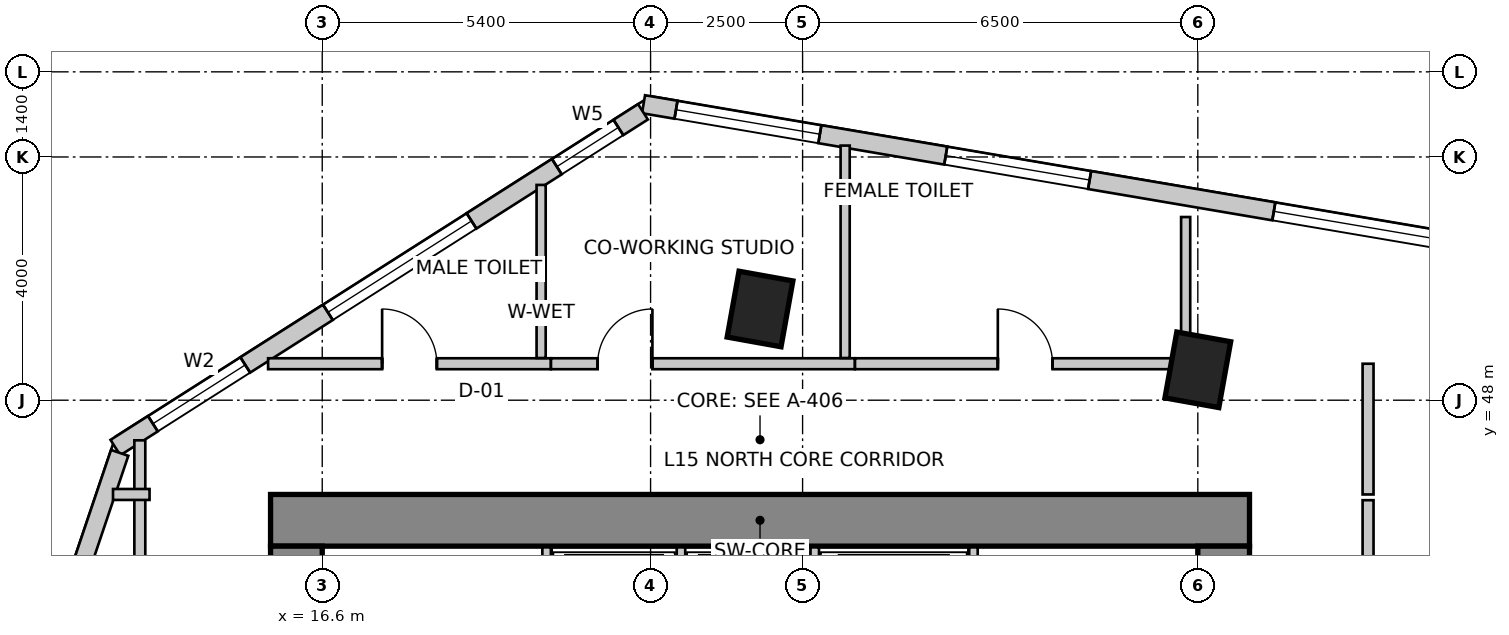
"""IFC4 building model, lengths in metres.
Left out: names, types, materials, properties, quantities, classifications, styles, units other than length and angle.
Written with IfcOpenShell. Run it as: python <this file> out.ifc"""

import sys

from ifc_helpers import new_model, si_unit, direction, frame, frame_2d, origin, origin_2d, place, context, subcontext, project, spatial, rectangle, extrude, source, transform, mapped, element, fill, save


model = new_model("IFC4")
c1 = context("Model", 3, precision=1e-05, world=origin(), true_north=direction((0.0, 1.0)))
c2 = subcontext(c1, "Body", "Model", "MODEL_VIEW")
j1 = project(units=[si_unit("LENGTHUNIT", "METRE"), si_unit("PLANEANGLEUNIT", "RADIAN")], contexts=[c1])
p1 = place(None, origin())
s1 = spatial("IfcSite", under=j1, at=p1, CompositionType="ELEMENT")
p2 = place(p1, origin())
s2 = spatial("IfcBuilding", under=s1, at=p2, CompositionType="ELEMENT")
p3 = place(p2, frame((0.0, 0.0, 63.0)))
s3 = spatial("IfcBuildingStorey", under=s2, at=p3, CompositionType="ELEMENT", Elevation=63.0)
p4 = place(p3, frame((15.75, 46.025, 0.0), z_axis=(0.0, 0.0, 1.0), x_axis=(1.0, 0.0, 0.0)))
e1 = element("IfcWall", 1, at=p4, inside=s3, PredefinedType="SHEAR", context=c2, shape_type="SweptSolid", body=[
    extrude(rectangle(XDim=16.1, YDim=0.85, at=frame_2d((8.05, 0.0))), origin(), (0.0, 0.0, 1.0), 4.0),
])
p5 = place(p3, frame((16.175, 34.2, 0.0), z_axis=(0.0, 0.0, 1.0), x_axis=(0.0, 1.0, 0.0)))
e2 = element("IfcWall", 2, at=p5, inside=s3, PredefinedType="SHEAR", context=c2, shape_type="SweptSolid", body=[
    extrude(rectangle(XDim=11.4, YDim=0.85, at=frame_2d((5.7, 0.0))), origin(), (0.0, 0.0, 1.0), 4.0),
])
m1 = source(origin(), c2, "Body", "SweptSolid", [
    extrude(rectangle(XDim=1.1, YDim=2.15, at=frame_2d((0.55, 1.075))), frame((0.0, 0.435, 0.0), z_axis=(0.0, -1.0, 0.0), x_axis=(1.0, 0.0, 0.0)), (0.0, 0.0, 1.0), 0.87),
])
p6 = place(p5, frame((7.15, 0.0, 0.0)))
e3 = element("IfcOpeningElement", 3, at=p6, cuts=e2, PredefinedType="OPENING", context=c2, shape_type="MappedRepresentation", body=[
    mapped(m1, transform((0.0, 0.0, 0.0), scale=1.0)),
])
p7 = place(p3, frame((31.425, 34.2, 0.0), z_axis=(0.0, 0.0, 1.0), x_axis=(0.0, 1.0, 0.0)))
e4 = element("IfcWall", 4, at=p7, inside=s3, PredefinedType="SHEAR", context=c2, shape_type="SweptSolid", body=[
    extrude(rectangle(XDim=11.4, YDim=0.85, at=frame_2d((5.7, 0.0))), origin(), (0.0, 0.0, 1.0), 4.0),
])
p8 = place(p7, frame((7.35, 0.0, 0.0)))
e5 = element("IfcOpeningElement", 5, at=p8, cuts=e4, PredefinedType="OPENING", context=c2, shape_type="MappedRepresentation", body=[
    mapped(m1, transform((0.0, 0.0, 0.0), scale=1.0)),
])
m2 = source(origin(), c2, "Body", "SweptSolid", [
    extrude(rectangle(XDim=0.9, YDim=1.1, at=origin_2d()), origin(), (0.0, 0.0, 1.0), 4.0),
])
for number, where, z_axis, x_axis in (
    (6, (23.8, 49.5, 0.0), (0.0, 0.0, 1.0), (0.984, -0.177, 0.0)),
    (7, (31.0, 48.5, 0.0), (0.0, 0.0, 1.0), (0.984, -0.177, 0.0)),
):
    element("IfcColumn", number, at=place(p3, frame(where, z_axis=z_axis, x_axis=x_axis)), inside=s3, PredefinedType="COLUMN", context=c2, shape_type="MappedRepresentation", body=[
        mapped(m2, transform((0.0, 0.0, 0.0), scale=1.0)),
    ])
p9 = place(p3, frame((53.961, 47.417, 0.0), z_axis=(0.0, 0.0, 1.0), x_axis=(-0.985865713455, 0.167537443678, 0.0)))
e8 = element("IfcWall", 8, at=p9, inside=s3, PredefinedType="SOLIDWALL", context=c2, shape_type="SweptSolid", body=[
    extrude(rectangle(XDim=32.537, YDim=0.3, at=frame_2d((16.269, 0.0))), origin(), (0.0, 0.0, 1.0), 3.75),
])
m3 = source(origin(), c2, "Body", "SweptSolid", [
    extrude(rectangle(XDim=2.1, YDim=2.0, at=frame_2d((1.05, 1.0))), frame((0.0, 0.16, 0.0), z_axis=(0.0, -1.0, 0.0), x_axis=(1.0, 0.0, 0.0)), (0.0, 0.0, 1.0), 0.32),
])
p10 = place(p9, frame((0.626, 0.0, 0.85)))
e9 = element("IfcOpeningElement", 9, at=p10, cuts=e8, PredefinedType="OPENING", context=c2, shape_type="MappedRepresentation", body=[
    mapped(m3, transform((0.0, 0.0, 0.0), scale=1.0)),
])
m4 = source(origin(), c2, "Body", "SweptSolid", [
    extrude(rectangle(XDim=2.4, YDim=2.2, at=frame_2d((1.2, 1.1))), frame((0.0, 0.16, 0.0), z_axis=(0.0, -1.0, 0.0), x_axis=(1.0, 0.0, 0.0)), (0.0, 0.0, 1.0), 0.32),
])
p11 = place(p9, frame((4.504, 0.0, 0.85)))
e10 = element("IfcOpeningElement", 10, at=p11, cuts=e8, PredefinedType="OPENING", context=c2, shape_type="MappedRepresentation", body=[
    mapped(m4, transform((0.0, 0.0, 0.0), scale=1.0)),
])
m5 = source(origin(), c2, "Body", "SweptSolid", [
    extrude(rectangle(XDim=2.8, YDim=2.4, at=frame_2d((1.4, 1.2))), frame((0.0, 0.16, 0.0), z_axis=(0.0, -1.0, 0.0), x_axis=(1.0, 0.0, 0.0)), (0.0, 0.0, 1.0), 0.32),
])
p12 = place(p9, frame((8.768, 0.0, 0.85)))
e11 = element("IfcOpeningElement", 11, at=p12, cuts=e8, PredefinedType="OPENING", context=c2, shape_type="MappedRepresentation", body=[
    mapped(m5, transform((0.0, 0.0, 0.0), scale=1.0)),
])
p13 = place(p9, frame((14.234, 0.0, 0.85)))
e12 = element("IfcOpeningElement", 12, at=p13, cuts=e8, PredefinedType="OPENING", context=c2, shape_type="MappedRepresentation", body=[
    mapped(m4, transform((0.0, 0.0, 0.0), scale=1.0)),
])
p14 = place(p9, frame((19.222, 0.0, 0.85)))
e13 = element("IfcOpeningElement", 13, at=p14, cuts=e8, PredefinedType="OPENING", context=c2, shape_type="MappedRepresentation", body=[
    mapped(m5, transform((0.0, 0.0, 0.0), scale=1.0)),
])
p15 = place(p9, frame((25.095, 0.0, 0.85)))
e14 = element("IfcOpeningElement", 14, at=p15, cuts=e8, PredefinedType="OPENING", context=c2, shape_type="MappedRepresentation", body=[
    mapped(m4, transform((0.0, 0.0, 0.0), scale=1.0)),
])
p16 = place(p9, frame((29.595, 0.0, 0.85)))
e15 = element("IfcOpeningElement", 15, at=p16, cuts=e8, PredefinedType="OPENING", context=c2, shape_type="MappedRepresentation", body=[
    mapped(m4, transform((0.0, 0.0, 0.0), scale=1.0)),
])
p17 = place(p3, frame((21.875, 52.742, 0.0), z_axis=(0.0, 0.0, 1.0), x_axis=(-0.843662465249, -0.536873956092, 0.0)))
e16 = element("IfcWall", 16, at=p17, inside=s3, PredefinedType="SOLIDWALL", context=c2, shape_type="SweptSolid", body=[
    extrude(rectangle(XDim=10.284, YDim=0.3, at=frame_2d((5.142, 0.0))), origin(), (0.0, 0.0, 1.0), 3.75),
])
m6 = source(origin(), c2, "Body", "SweptSolid", [
    extrude(rectangle(XDim=1.2, YDim=1.6, at=frame_2d((0.6, 0.8))), frame((0.0, 0.16, 0.0), z_axis=(0.0, -1.0, 0.0), x_axis=(1.0, 0.0, 0.0)), (0.0, 0.0, 1.0), 0.32),
])
p18 = place(p17, frame((0.479, 0.0, 0.85)))
e17 = element("IfcOpeningElement", 17, at=p18, cuts=e16, PredefinedType="OPENING", context=c2, shape_type="MappedRepresentation", body=[
    mapped(m6, transform((0.0, 0.0, 0.0), scale=1.0)),
])
p19 = place(p17, frame((3.342, 0.0, 0.85)))
e18 = element("IfcOpeningElement", 18, at=p19, cuts=e16, PredefinedType="OPENING", context=c2, shape_type="MappedRepresentation", body=[
    mapped(m5, transform((0.0, 0.0, 0.0), scale=1.0)),
])
m7 = source(origin(), c2, "Body", "SweptSolid", [
    extrude(rectangle(XDim=1.8, YDim=2.1, at=frame_2d((0.9, 1.05))), frame((0.0, 0.16, 0.0), z_axis=(0.0, -1.0, 0.0), x_axis=(1.0, 0.0, 0.0)), (0.0, 0.0, 1.0), 0.32),
])
p20 = place(p17, frame((7.753, 0.0, 0.85)))
e19 = element("IfcOpeningElement", 19, at=p20, cuts=e16, PredefinedType="OPENING", context=c2, shape_type="MappedRepresentation", body=[
    mapped(m7, transform((0.0, 0.0, 0.0), scale=1.0)),
])
p21 = place(p3, frame((13.269, 47.134, 0.0), z_axis=(0.0, 0.0, 1.0), x_axis=(-0.319920423265, -0.947444416722, 0.0)))
e20 = element("IfcWall", 20, at=p21, inside=s3, PredefinedType="SOLIDWALL", context=c2, shape_type="SweptSolid", body=[
    extrude(rectangle(XDim=16.135, YDim=0.3, at=frame_2d((8.067, 0.0))), origin(), (0.0, 0.0, 1.0), 3.75),
])
p22 = place(p21, frame((2.188, 0.0, 0.85)))
e21 = element("IfcOpeningElement", 21, at=p22, cuts=e20, PredefinedType="OPENING", context=c2, shape_type="MappedRepresentation", body=[
    mapped(m4, transform((0.0, 0.0, 0.0), scale=1.0)),
])
p23 = place(p21, frame((6.959, 0.0, 0.85)))
e22 = element("IfcOpeningElement", 22, at=p23, cuts=e20, PredefinedType="OPENING", context=c2, shape_type="MappedRepresentation", body=[
    mapped(m5, transform((0.0, 0.0, 0.0), scale=1.0)),
])
p24 = place(p21, frame((12.13, 0.0, 0.85)))
e23 = element("IfcOpeningElement", 23, at=p24, cuts=e20, PredefinedType="OPENING", context=c2, shape_type="MappedRepresentation", body=[
    mapped(m4, transform((0.0, 0.0, 0.0), scale=1.0)),
])
for number, where, z_axis, x_axis in (
    (24, (20.29, 43.28, 0.0), (0.0, 0.0, 1.0), (0.0, 1.0, 0.0)),
    (25, (27.31, 43.28, 0.0), (0.0, 0.0, 1.0), (0.0, 1.0, 0.0)),
):
    element("IfcWall", number, at=place(p3, frame(where, z_axis=z_axis, x_axis=x_axis)), inside=s3, PredefinedType="SOLIDWALL", context=c2, shape_type="SweptSolid", body=[
        extrude(rectangle(XDim=2.3, YDim=0.14, at=frame_2d((1.15, 0.0))), origin(), (0.0, 0.0, 1.0), 3.75),
    ])
for number, where, z_axis, x_axis in (
    (26, (22.5, 43.02, 0.0), (0.0, 0.0, 1.0), (0.0, 1.0, 0.0)),
    (27, (24.7, 43.02, 0.0), (0.0, 0.0, 1.0), (0.0, 1.0, 0.0)),
):
    element("IfcWall", number, at=place(p3, frame(where, z_axis=z_axis, x_axis=x_axis)), inside=s3, PredefinedType="SOLIDWALL", context=c2, shape_type="SweptSolid", body=[
        extrude(rectangle(XDim=2.56, YDim=0.14, at=frame_2d((1.28, 0.0))), origin(), (0.0, 0.0, 1.0), 3.75),
    ])
p25 = place(p3, frame((13.6, 33.444, 0.0), z_axis=(0.0, 0.0, 1.0), x_axis=(0.0, 1.0, 0.0)))
e28 = element("IfcWall", 28, at=p25, inside=s3, PredefinedType="PARTITIONING", context=c2, shape_type="SweptSolid", body=[
    extrude(rectangle(XDim=13.896, YDim=0.18, at=frame_2d((6.948, 0.0))), origin(), (0.0, 0.0, 1.0), 2.892),
])
m8 = source(origin(), c2, "Body", "SweptSolid", [
    extrude(rectangle(XDim=0.9, YDim=2.15, at=frame_2d((0.45, 1.075))), frame((0.0, 0.1, 0.0), z_axis=(0.0, -1.0, 0.0), x_axis=(1.0, 0.0, 0.0)), (0.0, 0.0, 1.0), 0.2),
])
p26 = place(p25, frame((4.144, 0.0, 0.0)))
e29 = element("IfcOpeningElement", 29, at=p26, cuts=e28, PredefinedType="OPENING", context=c2, shape_type="MappedRepresentation", body=[
    mapped(m8, transform((0.0, 0.0, 0.0), scale=1.0)),
])
p27 = place(p3, frame((13.76, 46.45, 0.0), z_axis=(0.0, 0.0, 1.0), x_axis=(-1.0, 0.0, 0.0)))
e30 = element("IfcWall", 30, at=p27, inside=s3, PredefinedType="PARTITIONING", context=c2, shape_type="SweptSolid", body=[
    extrude(rectangle(XDim=0.601, YDim=0.18, at=frame_2d((0.301, 0.0))), origin(), (0.0, 0.0, 1.0), 3.75),
])
p28 = place(p3, frame((15.71, 48.6, 0.0), z_axis=(0.0, 0.0, 1.0), x_axis=(1.0, 0.0, 0.0)))
e31 = element("IfcWall", 31, at=p28, inside=s3, PredefinedType="PARTITIONING", context=c2, shape_type="SweptSolid", body=[
    extrude(rectangle(XDim=4.65, YDim=0.18, at=frame_2d((2.325, 0.0))), origin(), (0.0, 0.0, 1.0), 3.75),
])
p29 = place(p28, frame((1.875, 0.0, 0.0)))
e32 = element("IfcOpeningElement", 32, at=p29, cuts=e31, PredefinedType="OPENING", context=c2, shape_type="MappedRepresentation", body=[
    mapped(m8, transform((0.0, 0.0, 0.0), scale=1.0)),
])
p30 = place(p3, frame((20.362, 48.6, 0.0), z_axis=(0.0, 0.0, 1.0), x_axis=(1.0, 0.0, 0.0)))
e33 = element("IfcWall", 33, at=p30, inside=s3, PredefinedType="PARTITIONING", context=c2, shape_type="SweptSolid", body=[
    extrude(rectangle(XDim=4.998, YDim=0.18, at=frame_2d((2.499, 0.0))), origin(), (0.0, 0.0, 1.0), 3.335),
])
p31 = place(p30, frame((0.768, 0.0, 0.0)))
e34 = element("IfcOpeningElement", 34, at=p31, cuts=e33, PredefinedType="OPENING", context=c2, shape_type="MappedRepresentation", body=[
    mapped(m8, transform((0.0, 0.0, 0.0), scale=1.0)),
])
p32 = place(p3, frame((25.362, 48.6, 0.0), z_axis=(0.0, 0.0, 1.0), x_axis=(1.0, 0.0, 0.0)))
e35 = element("IfcWall", 35, at=p32, inside=s3, PredefinedType="PARTITIONING", context=c2, shape_type="SweptSolid", body=[
    extrude(rectangle(XDim=5.598, YDim=0.18, at=frame_2d((2.799, 0.0))), origin(), (0.0, 0.0, 1.0), 2.892),
])
p33 = place(p32, frame((2.349, 0.0, 0.0)))
e36 = element("IfcOpeningElement", 36, at=p33, cuts=e35, PredefinedType="OPENING", context=c2, shape_type="MappedRepresentation", body=[
    mapped(m8, transform((0.0, 0.0, 0.0), scale=1.0)),
])
p34 = place(p3, frame((33.8, 48.6, 0.0), z_axis=(0.0, 0.0, 1.0), x_axis=(0.0, -1.0, 0.0)))
e37 = element("IfcWall", 37, at=p34, inside=s3, PredefinedType="PARTITIONING", context=c2, shape_type="SweptSolid", body=[
    extrude(rectangle(XDim=2.15, YDim=0.18, at=frame_2d((1.075, 0.0))), origin(), (0.0, 0.0, 1.0), 2.892),
])
p35 = place(p3, frame((33.8, 46.356, 0.0), z_axis=(0.0, 0.0, 1.0), x_axis=(0.0, -1.0, 0.0)))
e38 = element("IfcWall", 38, at=p35, inside=s3, PredefinedType="PARTITIONING", context=c2, shape_type="SweptSolid", body=[
    extrude(rectangle(XDim=3.716, YDim=0.18, at=frame_2d((1.858, 0.0))), origin(), (0.0, 0.0, 1.0), 3.188),
])
p36 = place(p3, frame((20.2, 51.54, 0.0), z_axis=(0.0, 0.0, 1.0), x_axis=(0.0, -1.0, 0.0)))
e39 = element("IfcWall", 39, at=p36, inside=s3, PredefinedType="PARTITIONING", context=c2, shape_type="SweptSolid", body=[
    extrude(rectangle(XDim=2.846, YDim=0.15, at=frame_2d((1.423, 0.0))), origin(), (0.0, 0.0, 1.0), 3.75),
])
p37 = place(p3, frame((25.2, 52.188, 0.0), z_axis=(0.0, 0.0, 1.0), x_axis=(0.0, -1.0, 0.0)))
e40 = element("IfcWall", 40, at=p37, inside=s3, PredefinedType="PARTITIONING", context=c2, shape_type="SweptSolid", body=[
    extrude(rectangle(XDim=3.493, YDim=0.15, at=frame_2d((1.747, 0.0))), origin(), (0.0, 0.0, 1.0), 2.892),
])
p38 = place(p3, frame((30.8, 51.013, 0.0), z_axis=(0.0, 0.0, 1.0), x_axis=(0.0, -1.0, 0.0)))
e41 = element("IfcWall", 41, at=p38, inside=s3, PredefinedType="PARTITIONING", context=c2, shape_type="SweptSolid", body=[
    extrude(rectangle(XDim=2.193, YDim=0.15, at=frame_2d((1.096, 0.0))), origin(), (0.0, 0.0, 1.0), 3.75),
])
m9 = source(origin(), c2, "Body", "SweptSolid", [
    extrude(rectangle(XDim=2.8, YDim=2.4, at=frame_2d((1.4, 1.2))), frame((0.0, -0.015, 0.0), z_axis=(0.0, -1.0, 0.0), x_axis=(1.0, 0.0, 0.0)), (0.0, 0.0, 1.0), 0.06),
])
p39 = place(p14, origin())
e42 = element("IfcWindow", 42, at=p39, inside=s3, PartitioningType="SINGLE_PANEL", PredefinedType="WINDOW", context=c2, shape_type="MappedRepresentation", body=[
    mapped(m9, transform((0.0, 0.0, 0.0), scale=1.0)),
])
fill(e13, e42)
m10 = source(origin(), c2, "Body", "SweptSolid", [
    extrude(rectangle(XDim=2.4, YDim=2.2, at=frame_2d((1.2, 1.1))), frame((0.0, -0.015, 0.0), z_axis=(0.0, -1.0, 0.0), x_axis=(1.0, 0.0, 0.0)), (0.0, 0.0, 1.0), 0.06),
])
p40 = place(p15, origin())
e43 = element("IfcWindow", 43, at=p40, inside=s3, PartitioningType="SINGLE_PANEL", PredefinedType="WINDOW", context=c2, shape_type="MappedRepresentation", body=[
    mapped(m10, transform((0.0, 0.0, 0.0), scale=1.0)),
])
fill(e14, e43)
p41 = place(p16, origin())
e44 = element("IfcWindow", 44, at=p41, inside=s3, PartitioningType="SINGLE_PANEL", PredefinedType="WINDOW", context=c2, shape_type="MappedRepresentation", body=[
    mapped(m10, transform((0.0, 0.0, 0.0), scale=1.0)),
])
fill(e15, e44)
m11 = source(origin(), c2, "Body", "SweptSolid", [
    extrude(rectangle(XDim=1.2, YDim=1.6, at=frame_2d((0.6, 0.8))), frame((0.0, -0.015, 0.0), z_axis=(0.0, -1.0, 0.0), x_axis=(1.0, 0.0, 0.0)), (0.0, 0.0, 1.0), 0.06),
])
p42 = place(p18, origin())
e45 = element("IfcWindow", 45, at=p42, inside=s3, PartitioningType="SINGLE_PANEL", PredefinedType="WINDOW", context=c2, shape_type="MappedRepresentation", body=[
    mapped(m11, transform((0.0, 0.0, 0.0), scale=1.0)),
])
fill(e17, e45)
p43 = place(p19, origin())
e46 = element("IfcWindow", 46, at=p43, inside=s3, PartitioningType="SINGLE_PANEL", PredefinedType="WINDOW", context=c2, shape_type="MappedRepresentation", body=[
    mapped(m9, transform((0.0, 0.0, 0.0), scale=1.0)),
])
fill(e18, e46)
m12 = source(origin(), c2, "Body", "SweptSolid", [
    extrude(rectangle(XDim=1.8, YDim=2.1, at=frame_2d((0.9, 1.05))), frame((0.0, -0.015, 0.0), z_axis=(0.0, -1.0, 0.0), x_axis=(1.0, 0.0, 0.0)), (0.0, 0.0, 1.0), 0.06),
])
p44 = place(p20, origin())
e47 = element("IfcWindow", 47, at=p44, inside=s3, PartitioningType="SINGLE_PANEL", PredefinedType="WINDOW", context=c2, shape_type="MappedRepresentation", body=[
    mapped(m12, transform((0.0, 0.0, 0.0), scale=1.0)),
])
fill(e19, e47)
m13 = source(origin(), c2, "Body", "SweptSolid", [
    extrude(rectangle(XDim=0.9, YDim=2.15, at=frame_2d((0.45, 1.075))), frame((0.0, 0.025, 0.0), z_axis=(0.0, -1.0, 0.0), x_axis=(1.0, 0.0, 0.0)), (0.0, 0.0, 1.0), 0.05),
])
p45 = place(p29, origin())
e48 = element("IfcDoor", 48, at=p45, inside=s3, OperationType="SINGLE_SWING_LEFT", PredefinedType="DOOR", context=c2, shape_type="MappedRepresentation", body=[
    mapped(m13, transform((0.0, 0.0, 0.0), scale=1.0)),
])
fill(e32, e48)
p46 = place(p31, origin())
e49 = element("IfcDoor", 49, at=p46, inside=s3, OperationType="SINGLE_SWING_RIGHT", PredefinedType="DOOR", context=c2, shape_type="MappedRepresentation", body=[
    mapped(m13, transform((0.0, 0.0, 0.0), scale=1.0)),
])
fill(e34, e49)
p47 = place(p33, origin())
e50 = element("IfcDoor", 50, at=p47, inside=s3, OperationType="SINGLE_SWING_LEFT", PredefinedType="DOOR", context=c2, shape_type="MappedRepresentation", body=[
    mapped(m13, transform((0.0, 0.0, 0.0), scale=1.0)),
])
fill(e36, e50)
save(model, sys.argv[1])
